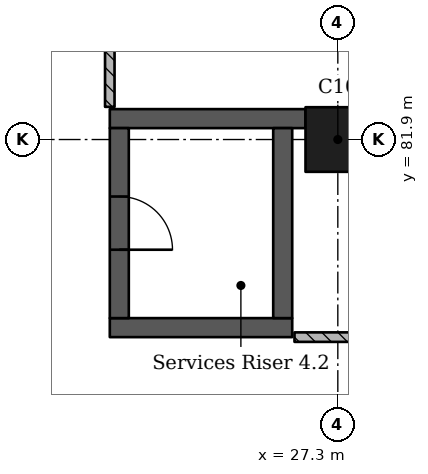
"""IFC4 building model, lengths in metres.
Left out: names, types, materials, properties, quantities, classifications, styles, units other than length and angle.
Written with IfcOpenShell. Run it as: python <this file> out.ifc"""

import sys

from ifc_helpers import new_model, si_unit, direction, frame, frame_2d, origin, origin_2d, place, context, subcontext, project, spatial, rectangle, extrude, element, fill, save


model = new_model("IFC4")
c1 = context("Model", 3, precision=1e-05, world=origin(), true_north=direction((0.0, 1.0)))
c2 = subcontext(c1, "Body", "Model", "MODEL_VIEW")
j1 = project(units=[si_unit("LENGTHUNIT", "METRE"), si_unit("PLANEANGLEUNIT", "RADIAN")], contexts=[c1])
p1 = place(None, origin())
s1 = spatial("IfcSite", under=j1, at=p1, CompositionType="ELEMENT")
p2 = place(p1, origin())
s2 = spatial("IfcBuilding", under=s1, at=p2, CompositionType="ELEMENT")
p3 = place(p2, origin())
s3 = spatial("IfcBuildingStorey", under=s2, at=p3, CompositionType="ELEMENT", Elevation=0.0)
p4 = place(p3, frame((27.3, 81.9, -0.4), z_axis=(0.0, 0.0, 1.0), x_axis=(1.0, 0.0, 0.0)))
e1 = element("IfcColumn", 1, at=p4, inside=s3, PredefinedType="COLUMN", context=c2, shape_type="SweptSolid", body=[
    extrude(rectangle(XDim=0.85, YDim=0.85, at=origin_2d()), origin(), (0.0, 0.0, 1.0), 6.77),
])
p5 = place(p3, frame((26.7, 79.425, -0.4), z_axis=(0.0, 0.0, 1.0), x_axis=(-1.0, 0.0, 0.0)))
e2 = element("IfcWall", 2, at=p5, inside=s3, PredefinedType="SHEAR", context=c2, shape_type="SweptSolid", body=[
    extrude(rectangle(XDim=2.4, YDim=0.25, at=frame_2d((1.2, 0.0))), origin(), (0.0, 0.0, 1.0), 6.77),
])
p6 = place(p3, frame((26.875, 82.175, -0.4), z_axis=(0.0, 0.0, 1.0), x_axis=(-1.0, 0.0, 0.0)))
e3 = element("IfcWall", 3, at=p6, inside=s3, PredefinedType="SHEAR", context=c2, shape_type="SweptSolid", body=[
    extrude(rectangle(XDim=2.575, YDim=0.25, at=frame_2d((1.288, 0.0))), origin(), (0.0, 0.0, 1.0), 6.77),
])
p7 = place(p3, frame((24.425, 82.05, -0.4), z_axis=(0.0, 0.0, 1.0), x_axis=(0.0, -1.0, 0.0)))
e4 = element("IfcWall", 4, at=p7, inside=s3, PredefinedType="SHEAR", context=c2, shape_type="SweptSolid", body=[
    extrude(rectangle(XDim=2.5, YDim=0.25, at=frame_2d((1.25, 0.0))), origin(), (0.0, 0.0, 1.0), 6.77),
])
p8 = place(p7, frame((0.9, 0.0, 0.4)))
e5 = element("IfcOpeningElement", 5, at=p8, cuts=e4, PredefinedType="OPENING", context=c2, shape_type="SweptSolid", body=[
    extrude(rectangle(XDim=0.7, YDim=2.1, at=frame_2d((0.35, 1.05))), frame((0.0, 0.135, 0.0), z_axis=(0.0, -1.0, 0.0), x_axis=(1.0, 0.0, 0.0)), (0.0, 0.0, 1.0), 0.27),
])
p9 = place(p3, frame((26.575, 82.05, -0.4), z_axis=(0.0, 0.0, 1.0), x_axis=(0.0, -1.0, 0.0)))
e6 = element("IfcWall", 6, at=p9, inside=s3, PredefinedType="SHEAR", context=c2, shape_type="SweptSolid", body=[
    extrude(rectangle(XDim=2.5, YDim=0.25, at=frame_2d((1.25, 0.0))), origin(), (0.0, 0.0, 1.0), 6.77),
])
p10 = place(p3, frame((24.3, 82.33, 0.0), z_axis=(0.0, 0.0, 1.0), x_axis=(0.0, 1.0, 0.0)))
e7 = element("IfcWall", 7, at=p10, inside=s3, PredefinedType="PARTITIONING", context=c2, shape_type="SweptSolid", body=[
    extrude(rectangle(XDim=6.97, YDim=0.125, at=frame_2d((3.485, 0.0))), origin(), (0.0, 0.0, 1.0), 6.02),
])
p11 = place(p3, frame((28.163, 79.3, 0.0), z_axis=(0.0, 0.0, 1.0), x_axis=(-1.0, 0.0, 0.0)))
e8 = element("IfcWall", 8, at=p11, inside=s3, PredefinedType="PARTITIONING", context=c2, shape_type="SweptSolid", body=[
    extrude(rectangle(XDim=1.433, YDim=0.125, at=frame_2d((0.716, 0.0))), origin(), (0.0, 0.0, 1.0), 6.02),
])
p12 = place(p8, origin())
e9 = element("IfcDoor", 9, at=p12, inside=s3, OperationType="SINGLE_SWING_LEFT", PredefinedType="DOOR", context=c2, shape_type="SweptSolid", body=[
    extrude(rectangle(XDim=0.7, YDim=2.1, at=frame_2d((0.35, 1.05))), frame((0.0, 0.025, 0.0), z_axis=(0.0, -1.0, 0.0), x_axis=(1.0, 0.0, 0.0)), (0.0, 0.0, 1.0), 0.05),
])
fill(e5, e9)
save(model, sys.argv[1])
